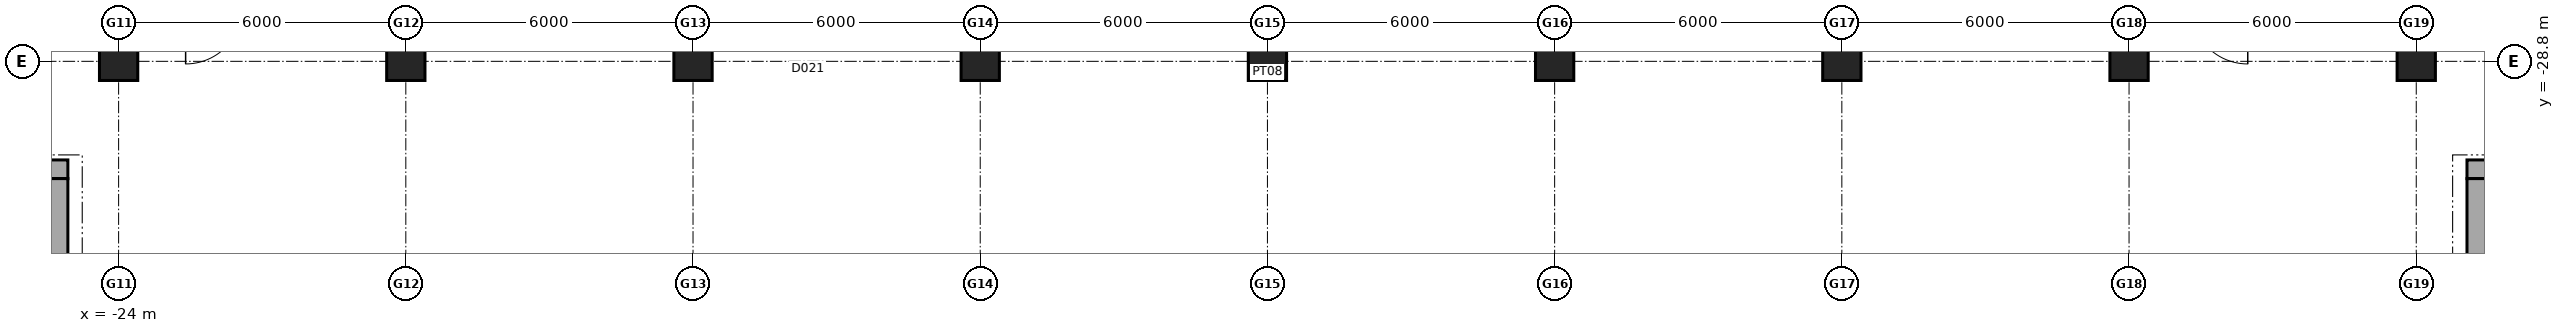
"""IFC4 building model, lengths in metres.
Left out: names, types, materials, properties, quantities, classifications, styles, units other than length and angle.
Written with IfcOpenShell. Run it as: python <this file> out.ifc"""

import sys

from ifc_helpers import new_model, si_unit, direction, frame, frame_2d, origin, origin_2d, place, context, subcontext, project, spatial, rectangle, extrude, element, save


model = new_model("IFC4")
c1 = context("Model", 3, precision=1e-05, world=origin(), true_north=direction((0.0, 1.0)))
c2 = subcontext(c1, "Body", "Model", "MODEL_VIEW")
j1 = project(units=[si_unit("LENGTHUNIT", "METRE"), si_unit("PLANEANGLEUNIT", "RADIAN")], contexts=[c1])
p1 = place(None, origin())
s1 = spatial("IfcSite", under=j1, at=p1, CompositionType="ELEMENT")
p2 = place(p1, origin())
s2 = spatial("IfcBuilding", under=s1, at=p2, CompositionType="ELEMENT")
p3 = place(p2, frame((0.0, 0.0, 5.4)))
s3 = spatial("IfcBuildingStorey", under=s2, at=p3, CompositionType="ELEMENT", Elevation=5.4)
for number, where, z_axis, x_axis in (
    (1, (-24.0, -28.8, 0.0), (0.0, 0.0, 1.0), (1.0, 0.0, 0.0)),
    (2, (-18.0, -28.8, 0.0), (0.0, 0.0, 1.0), (1.0, 0.0, 0.0)),
    (3, (-12.0, -28.8, 0.0), (0.0, 0.0, 1.0), (1.0, 0.0, 0.0)),
    (4, (-6.0, -28.8, 0.0), (0.0, 0.0, 1.0), (1.0, 0.0, 0.0)),
    (5, (0.0, -28.8, 0.0), (0.0, 0.0, 1.0), (1.0, 0.0, 0.0)),
    (6, (6.0, -28.8, 0.0), (0.0, 0.0, 1.0), (1.0, 0.0, 0.0)),
    (7, (12.0, -28.8, 0.0), (0.0, 0.0, 1.0), (1.0, 0.0, 0.0)),
    (8, (18.0, -28.8, 0.0), (0.0, 0.0, 1.0), (1.0, 0.0, 0.0)),
    (9, (24.0, -28.8, 0.0), (0.0, 0.0, 1.0), (1.0, 0.0, 0.0)),
):
    element("IfcColumn", number, at=place(p3, frame(where, z_axis=z_axis, x_axis=x_axis)), inside=s3, PredefinedType="COLUMN", context=c2, shape_type="SweptSolid", body=[
        extrude(rectangle(XDim=0.8, YDim=0.8, at=origin_2d()), origin(), (0.0, 0.0, 1.0), 4.8),
    ])
p4 = place(p3, frame((-28.54, -31.055, 0.0), z_axis=(0.0, 0.0, 1.0), x_axis=(1.0, 0.0, 0.0)))
e10 = element("IfcWall", 10, at=p4, inside=s3, PredefinedType="SHEAR", context=c2, shape_type="SweptSolid", body=[
    extrude(rectangle(XDim=3.48, YDim=0.39, at=frame_2d((1.74, 0.0))), origin(), (0.0, 0.0, 1.0), 4.8),
])
p5 = place(p4, frame((1.19, 0.0, 0.0)))
e11 = element("IfcOpeningElement", 11, at=p5, cuts=e10, PredefinedType="OPENING", context=c2, shape_type="SweptSolid", body=[
    extrude(rectangle(XDim=1.1, YDim=2.15, at=frame_2d((0.55, 1.075))), frame((0.0, 0.205, 0.0), z_axis=(0.0, -1.0, 0.0), x_axis=(1.0, 0.0, 0.0)), (0.0, 0.0, 1.0), 0.41),
])
p6 = place(p3, frame((-25.255, -31.25, 0.0), z_axis=(0.0, 0.0, 1.0), x_axis=(0.0, -1.0, 0.0)))
e12 = element("IfcWall", 12, at=p6, inside=s3, PredefinedType="SHEAR", context=c2, shape_type="SweptSolid", body=[
    extrude(rectangle(XDim=2.3, YDim=0.39, at=frame_2d((1.15, 0.0))), origin(), (0.0, 0.0, 1.0), 4.8),
])
p7 = place(p3, frame((25.06, -31.055, 0.0), z_axis=(0.0, 0.0, 1.0), x_axis=(1.0, 0.0, 0.0)))
e13 = element("IfcWall", 13, at=p7, inside=s3, PredefinedType="SHEAR", context=c2, shape_type="SweptSolid", body=[
    extrude(rectangle(XDim=3.48, YDim=0.39, at=frame_2d((1.74, 0.0))), origin(), (0.0, 0.0, 1.0), 4.8),
])
p8 = place(p7, frame((1.19, 0.0, 0.0)))
e14 = element("IfcOpeningElement", 14, at=p8, cuts=e13, PredefinedType="OPENING", context=c2, shape_type="SweptSolid", body=[
    extrude(rectangle(XDim=1.1, YDim=2.15, at=frame_2d((0.55, 1.075))), frame((0.0, 0.205, 0.0), z_axis=(0.0, -1.0, 0.0), x_axis=(1.0, 0.0, 0.0)), (0.0, 0.0, 1.0), 0.41),
])
p9 = place(p3, frame((25.255, -33.55, 0.0), z_axis=(0.0, 0.0, 1.0), x_axis=(0.0, 1.0, 0.0)))
e15 = element("IfcWall", 15, at=p9, inside=s3, PredefinedType="SHEAR", context=c2, shape_type="SweptSolid", body=[
    extrude(rectangle(XDim=2.3, YDim=0.39, at=frame_2d((1.15, 0.0))), origin(), (0.0, 0.0, 1.0), 4.8),
])
save(model, sys.argv[1])
